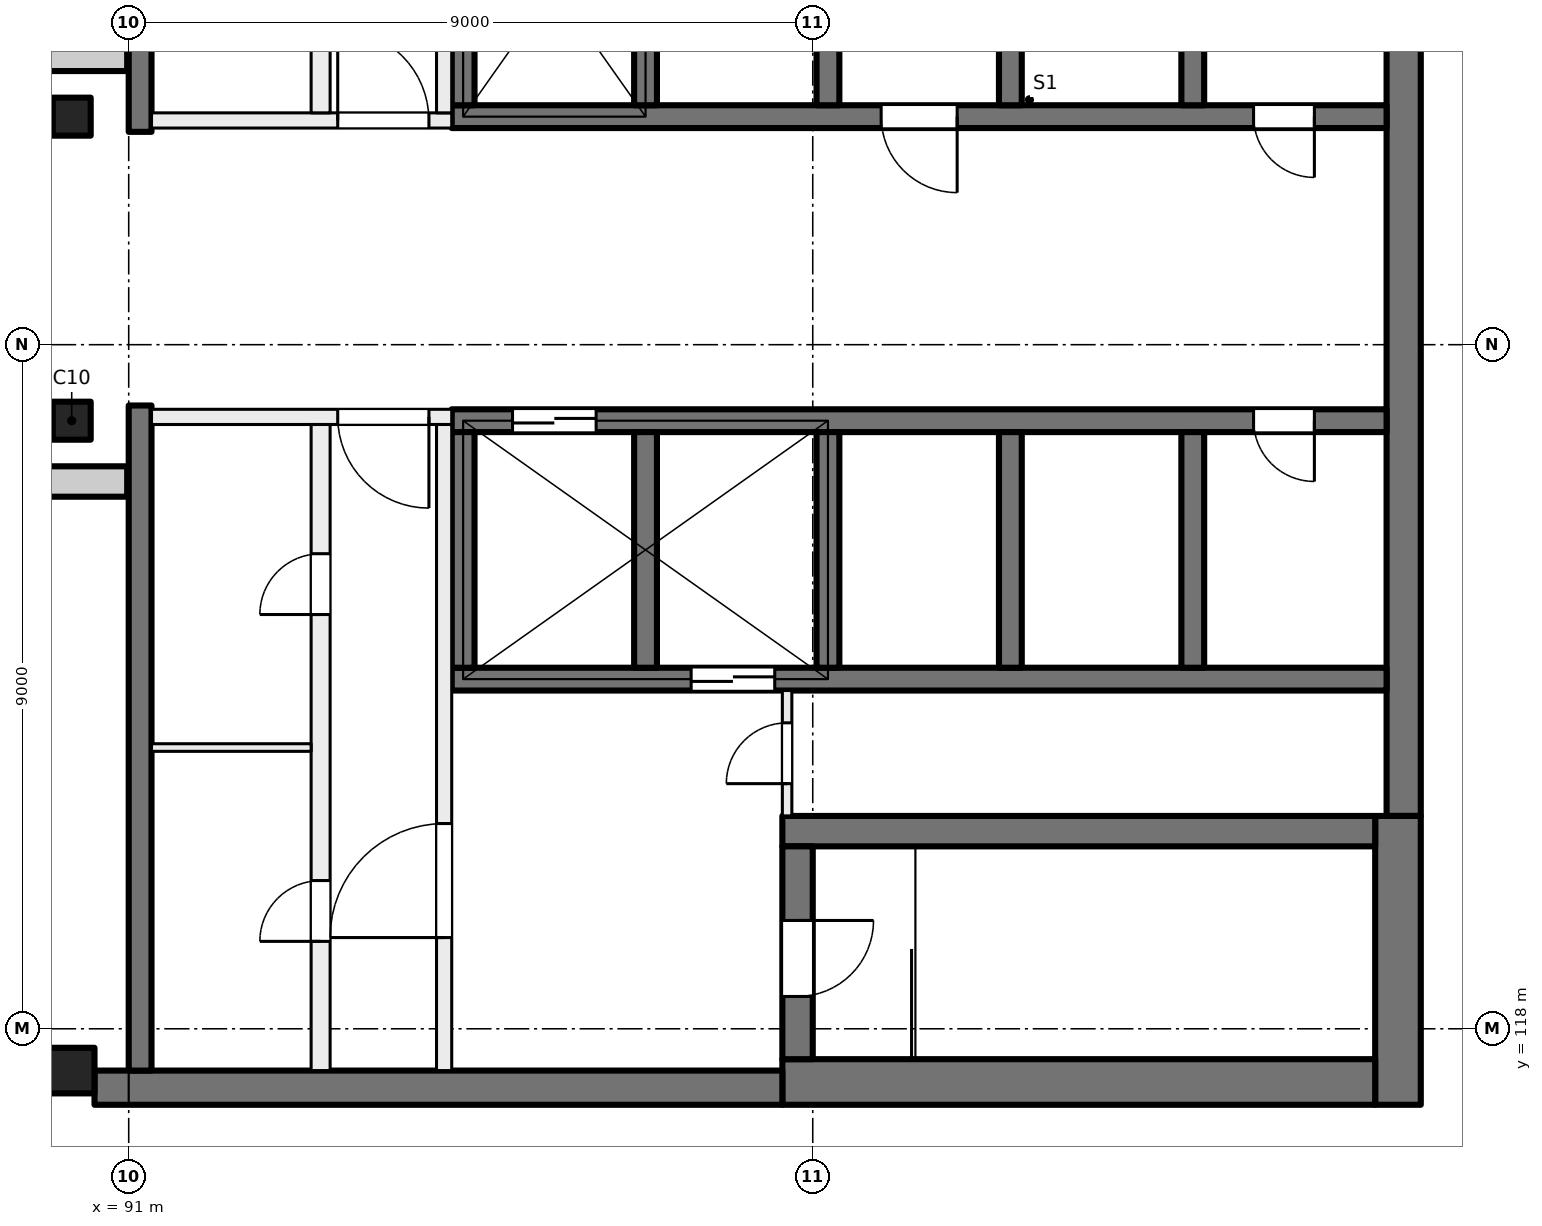
"""IFC4 building model, lengths in metres.
Left out: names, types, materials, properties, quantities, classifications, styles, units other than length and angle.
Written with IfcOpenShell. Run it as: python <this file> out.ifc"""

import sys

from ifc_helpers import new_model, si_unit, direction, frame, frame_2d, origin, origin_2d, place, context, subcontext, project, spatial, rectangle, extrude, element, fill, save


model = new_model("IFC4")
c1 = context("Model", 3, precision=1e-05, world=origin(), true_north=direction((0.0, 1.0)))
c2 = subcontext(c1, "Body", "Model", "MODEL_VIEW")
j1 = project(units=[si_unit("LENGTHUNIT", "METRE"), si_unit("PLANEANGLEUNIT", "RADIAN")], contexts=[c1])
p1 = place(None, origin())
s1 = spatial("IfcSite", under=j1, at=p1, CompositionType="ELEMENT")
p2 = place(p1, origin())
s2 = spatial("IfcBuilding", under=s1, at=p2, CompositionType="ELEMENT")
p3 = place(p2, frame((0.0, 0.0, 295.5)))
s3 = spatial("IfcBuildingStorey", under=s2, at=p3, CompositionType="ELEMENT", Elevation=295.5)
for number, where, z_axis, x_axis in (
    (1, (90.25, 130.0, 0.0), (0.0, 0.0, 1.0), (1.0, 0.0, 0.0)),
    (2, (90.25, 126.0, 0.0), (0.0, 0.0, 1.0), (1.0, 0.0, 0.0)),
):
    element("IfcColumn", number, at=place(p3, frame(where, z_axis=z_axis, x_axis=x_axis)), inside=s3, PredefinedType="COLUMN", context=c2, shape_type="SweptSolid", body=[
        extrude(rectangle(XDim=0.5, YDim=0.5, at=origin_2d()), origin(), (0.0, 0.0, 1.0), 4.5),
    ])
p4 = place(p3, frame((90.25, 117.45, 0.0), z_axis=(0.0, 0.0, 1.0), x_axis=(1.0, 0.0, 0.0)))
e3 = element("IfcColumn", 3, at=p4, inside=s3, PredefinedType="COLUMN", context=c2, shape_type="SweptSolid", body=[
    extrude(rectangle(XDim=0.6, YDim=0.6, at=origin_2d()), origin(), (0.0, 0.0, 1.0), 4.5),
])
p5 = place(p3, frame((107.775, 135.2, 0.0), z_axis=(0.0, 0.0, 1.0), x_axis=(0.0, -1.0, 0.0)))
e4 = element("IfcWall", 4, at=p5, inside=s3, PredefinedType="SHEAR", context=c2, shape_type="SweptSolid", body=[
    extrude(rectangle(XDim=14.4, YDim=0.45, at=frame_2d((7.2, 0.0))), origin(), (0.0, 0.0, 1.0), 4.5),
])
p6 = place(p3, frame((107.7, 120.8, 0.0), z_axis=(0.0, 0.0, 1.0), x_axis=(0.0, -1.0, 0.0)))
e5 = element("IfcWall", 5, at=p6, inside=s3, PredefinedType="SHEAR", context=c2, shape_type="SweptSolid", body=[
    extrude(rectangle(XDim=3.8, YDim=0.6, at=frame_2d((1.9, 0.0))), origin(), (0.0, 0.0, 1.0), 4.5),
])
p7 = place(p3, frame((107.4, 117.3, 0.0), z_axis=(0.0, 0.0, 1.0), x_axis=(-1.0, 0.0, 0.0)))
e6 = element("IfcWall", 6, at=p7, inside=s3, PredefinedType="SHEAR", context=c2, shape_type="SweptSolid", body=[
    extrude(rectangle(XDim=7.8, YDim=0.6, at=frame_2d((3.9, 0.0))), origin(), (0.0, 0.0, 1.0), 4.5),
])
p8 = place(p3, frame((99.6, 117.225, 0.0), z_axis=(0.0, 0.0, 1.0), x_axis=(-1.0, 0.0, 0.0)))
e7 = element("IfcWall", 7, at=p8, inside=s3, PredefinedType="SHEAR", context=c2, shape_type="SweptSolid", body=[
    extrude(rectangle(XDim=9.05, YDim=0.45, at=frame_2d((4.525, 0.0))), origin(), (0.0, 0.0, 1.0), 4.5),
])
p9 = place(p3, frame((107.4, 120.6, 0.0), z_axis=(0.0, 0.0, 1.0), x_axis=(-1.0, 0.0, 0.0)))
e8 = element("IfcWall", 8, at=p9, inside=s3, PredefinedType="SHEAR", context=c2, shape_type="SweptSolid", body=[
    extrude(rectangle(XDim=7.8, YDim=0.4, at=frame_2d((3.9, 0.0))), origin(), (0.0, 0.0, 1.0), 4.5),
])
p10 = place(p3, frame((99.8, 120.4, 0.0), z_axis=(0.0, 0.0, 1.0), x_axis=(0.0, -1.0, 0.0)))
e9 = element("IfcWall", 9, at=p10, inside=s3, PredefinedType="SHEAR", context=c2, shape_type="SweptSolid", body=[
    extrude(rectangle(XDim=2.8, YDim=0.4, at=frame_2d((1.4, 0.0))), origin(), (0.0, 0.0, 1.0), 4.5),
])
p11 = place(p10, frame((0.975, 0.0, 0.0)))
e10 = element("IfcOpeningElement", 10, at=p11, cuts=e9, PredefinedType="OPENING", context=c2, shape_type="SweptSolid", body=[
    extrude(rectangle(XDim=1.0, YDim=2.1, at=frame_2d((0.5, 1.05))), frame((0.0, 0.21, 0.0), z_axis=(0.0, -1.0, 0.0), x_axis=(1.0, 0.0, 0.0)), (0.0, 0.0, 1.0), 0.42),
])
p12 = place(p3, frame((107.55, 130.0, 0.0), z_axis=(0.0, 0.0, 1.0), x_axis=(-1.0, 0.0, 0.0)))
e11 = element("IfcWall", 11, at=p12, inside=s3, PredefinedType="SHEAR", context=c2, shape_type="SweptSolid", body=[
    extrude(rectangle(XDim=12.3, YDim=0.3, at=frame_2d((6.15, 0.0))), origin(), (0.0, 0.0, 1.0), 4.5),
])
p13 = place(p12, frame((0.95, 0.0, 0.0)))
e12 = element("IfcOpeningElement", 12, at=p13, cuts=e11, PredefinedType="OPENING", context=c2, shape_type="SweptSolid", body=[
    extrude(rectangle(XDim=0.8, YDim=2.1, at=frame_2d((0.4, 1.05))), frame((0.0, 0.16, 0.0), z_axis=(0.0, -1.0, 0.0), x_axis=(1.0, 0.0, 0.0)), (0.0, 0.0, 1.0), 0.32),
])
p14 = place(p12, frame((5.65, 0.0, 0.0)))
e13 = element("IfcOpeningElement", 13, at=p14, cuts=e11, PredefinedType="OPENING", context=c2, shape_type="SweptSolid", body=[
    extrude(rectangle(XDim=1.0, YDim=2.1, at=frame_2d((0.5, 1.05))), frame((0.0, 0.16, 0.0), z_axis=(0.0, -1.0, 0.0), x_axis=(1.0, 0.0, 0.0)), (0.0, 0.0, 1.0), 0.32),
])
for number, where, z_axis, x_axis in (
    (14, (105.0, 133.25, 0.0), (0.0, 0.0, 1.0), (0.0, -1.0, 0.0)),
    (15, (102.6, 133.25, 0.0), (0.0, 0.0, 1.0), (0.0, -1.0, 0.0)),
    (16, (100.2, 133.25, 0.0), (0.0, 0.0, 1.0), (0.0, -1.0, 0.0)),
    (17, (97.8, 133.25, 0.0), (0.0, 0.0, 1.0), (0.0, -1.0, 0.0)),
    (18, (95.4, 133.25, 0.0), (0.0, 0.0, 1.0), (0.0, -1.0, 0.0)),
):
    element("IfcWall", number, at=place(p3, frame(where, z_axis=z_axis, x_axis=x_axis)), inside=s3, PredefinedType="SHEAR", context=c2, shape_type="SweptSolid", body=[
        extrude(rectangle(XDim=3.1, YDim=0.3, at=frame_2d((1.55, 0.0))), origin(), (0.0, 0.0, 1.0), 4.5),
    ])
p15 = place(p3, frame((107.55, 126.0, 0.0), z_axis=(0.0, 0.0, 1.0), x_axis=(-1.0, 0.0, 0.0)))
e19 = element("IfcWall", 19, at=p15, inside=s3, PredefinedType="SHEAR", context=c2, shape_type="SweptSolid", body=[
    extrude(rectangle(XDim=12.3, YDim=0.3, at=frame_2d((6.15, 0.0))), origin(), (0.0, 0.0, 1.0), 4.5),
])
p16 = place(p15, frame((10.4, 0.0, 0.0)))
e20 = element("IfcOpeningElement", 20, at=p16, cuts=e19, PredefinedType="OPENING", context=c2, shape_type="SweptSolid", body=[
    extrude(rectangle(XDim=1.1, YDim=2.1, at=frame_2d((0.55, 1.05))), frame((0.0, 0.16, 0.0), z_axis=(0.0, -1.0, 0.0), x_axis=(1.0, 0.0, 0.0)), (0.0, 0.0, 1.0), 0.32),
])
p17 = place(p15, frame((0.95, 0.0, 0.0)))
e21 = element("IfcOpeningElement", 21, at=p17, cuts=e19, PredefinedType="OPENING", context=c2, shape_type="SweptSolid", body=[
    extrude(rectangle(XDim=0.8, YDim=2.1, at=frame_2d((0.4, 1.05))), frame((0.0, 0.16, 0.0), z_axis=(0.0, -1.0, 0.0), x_axis=(1.0, 0.0, 0.0)), (0.0, 0.0, 1.0), 0.32),
])
p18 = place(p3, frame((107.55, 122.6, 0.0), z_axis=(0.0, 0.0, 1.0), x_axis=(-1.0, 0.0, 0.0)))
e22 = element("IfcWall", 22, at=p18, inside=s3, PredefinedType="SHEAR", context=c2, shape_type="SweptSolid", body=[
    extrude(rectangle(XDim=12.3, YDim=0.3, at=frame_2d((6.15, 0.0))), origin(), (0.0, 0.0, 1.0), 4.5),
])
p19 = place(p18, frame((8.05, 0.0, 0.0)))
e23 = element("IfcOpeningElement", 23, at=p19, cuts=e22, PredefinedType="OPENING", context=c2, shape_type="SweptSolid", body=[
    extrude(rectangle(XDim=1.1, YDim=2.1, at=frame_2d((0.55, 1.05))), frame((0.0, 0.16, 0.0), z_axis=(0.0, -1.0, 0.0), x_axis=(1.0, 0.0, 0.0)), (0.0, 0.0, 1.0), 0.32),
])
for number, where, z_axis, x_axis in (
    (24, (105.0, 125.85, 0.0), (0.0, 0.0, 1.0), (0.0, -1.0, 0.0)),
    (25, (102.6, 125.85, 0.0), (0.0, 0.0, 1.0), (0.0, -1.0, 0.0)),
    (26, (100.2, 125.85, 0.0), (0.0, 0.0, 1.0), (0.0, -1.0, 0.0)),
    (27, (97.8, 125.85, 0.0), (0.0, 0.0, 1.0), (0.0, -1.0, 0.0)),
    (28, (95.4, 125.85, 0.0), (0.0, 0.0, 1.0), (0.0, -1.0, 0.0)),
):
    element("IfcWall", number, at=place(p3, frame(where, z_axis=z_axis, x_axis=x_axis)), inside=s3, PredefinedType="SHEAR", context=c2, shape_type="SweptSolid", body=[
        extrude(rectangle(XDim=3.1, YDim=0.3, at=frame_2d((1.55, 0.0))), origin(), (0.0, 0.0, 1.0), 4.5),
    ])
for number, where, z_axis, x_axis in (
    (29, (91.15, 138.55, 0.0), (0.0, 0.0, 1.0), (0.0, -1.0, 0.0)),
    (30, (91.15, 126.2, 0.0), (0.0, 0.0, 1.0), (0.0, -1.0, 0.0)),
):
    element("IfcWall", number, at=place(p3, frame(where, z_axis=z_axis, x_axis=x_axis)), inside=s3, PredefinedType="SHEAR", context=c2, shape_type="SweptSolid", body=[
        extrude(rectangle(XDim=8.75, YDim=0.3, at=frame_2d((4.375, 0.0))), origin(), (0.0, 0.0, 1.0), 4.5),
    ])
p20 = place(p3, frame((90.98, 125.2, 0.0), z_axis=(0.0, 0.0, 1.0), x_axis=(-1.0, 0.0, 0.0)))
e31 = element("IfcWall", 31, at=p20, inside=s3, PredefinedType="SOLIDWALL", context=c2, shape_type="SweptSolid", body=[
    extrude(rectangle(XDim=38.48, YDim=0.4, at=frame_2d((19.24, 0.0))), origin(), (0.0, 0.0, 1.0), 4.125),
])
p21 = place(p3, frame((72.42, 130.8, 0.0), z_axis=(0.0, 0.0, 1.0), x_axis=(1.0, 0.0, 0.0)))
e32 = element("IfcWall", 32, at=p21, inside=s3, PredefinedType="SOLIDWALL", context=c2, shape_type="SweptSolid", body=[
    extrude(rectangle(XDim=18.56, YDim=0.4, at=frame_2d((9.28, 0.0))), origin(), (0.0, 0.0, 1.0), 4.125),
])
p22 = place(p3, frame((95.25, 126.05, 0.0), z_axis=(0.0, 0.0, 1.0), x_axis=(-1.0, 0.0, 0.0)))
e33 = element("IfcWall", 33, at=p22, inside=s3, PredefinedType="PARTITIONING", context=c2, shape_type="SweptSolid", body=[
    extrude(rectangle(XDim=3.95, YDim=0.2, at=frame_2d((1.975, 0.0))), origin(), (0.0, 0.0, 1.0), 4.125),
])
p23 = place(p22, frame((0.3, 0.0, 0.0)))
e34 = element("IfcOpeningElement", 34, at=p23, cuts=e33, PredefinedType="OPENING", context=c2, shape_type="SweptSolid", body=[
    extrude(rectangle(XDim=1.2, YDim=2.1, at=frame_2d((0.6, 1.05))), frame((0.0, 0.11, 0.0), z_axis=(0.0, -1.0, 0.0), x_axis=(1.0, 0.0, 0.0)), (0.0, 0.0, 1.0), 0.22),
])
p24 = place(p3, frame((95.15, 117.45, 0.0), z_axis=(0.0, 0.0, 1.0), x_axis=(0.0, 1.0, 0.0)))
e35 = element("IfcWall", 35, at=p24, inside=s3, PredefinedType="PARTITIONING", context=c2, shape_type="SweptSolid", body=[
    extrude(rectangle(XDim=8.5, YDim=0.2, at=frame_2d((4.25, 0.0))), origin(), (0.0, 0.0, 1.0), 4.125),
])
p25 = place(p24, frame((1.75, 0.0, 0.0)))
e36 = element("IfcOpeningElement", 36, at=p25, cuts=e35, PredefinedType="OPENING", context=c2, shape_type="SweptSolid", body=[
    extrude(rectangle(XDim=1.5, YDim=2.1, at=frame_2d((0.75, 1.05))), frame((0.0, 0.11, 0.0), z_axis=(0.0, -1.0, 0.0), x_axis=(1.0, 0.0, 0.0)), (0.0, 0.0, 1.0), 0.22),
])
p26 = place(p3, frame((93.525, 117.45, 0.0), z_axis=(0.0, 0.0, 1.0), x_axis=(0.0, 1.0, 0.0)))
e37 = element("IfcWall", 37, at=p26, inside=s3, PredefinedType="PARTITIONING", context=c2, shape_type="SweptSolid", body=[
    extrude(rectangle(XDim=8.5, YDim=0.25, at=frame_2d((4.25, 0.0))), origin(), (0.0, 0.0, 1.0), 4.125),
])
p27 = place(p26, frame((6.0, 0.0, 0.0)))
e38 = element("IfcOpeningElement", 38, at=p27, cuts=e37, PredefinedType="OPENING", context=c2, shape_type="SweptSolid", body=[
    extrude(rectangle(XDim=0.8, YDim=2.1, at=frame_2d((0.4, 1.05))), frame((0.0, 0.135, 0.0), z_axis=(0.0, -1.0, 0.0), x_axis=(1.0, 0.0, 0.0)), (0.0, 0.0, 1.0), 0.27),
])
p28 = place(p26, frame((1.7, 0.0, 0.0)))
e39 = element("IfcOpeningElement", 39, at=p28, cuts=e37, PredefinedType="OPENING", context=c2, shape_type="SweptSolid", body=[
    extrude(rectangle(XDim=0.8, YDim=2.1, at=frame_2d((0.4, 1.05))), frame((0.0, 0.135, 0.0), z_axis=(0.0, -1.0, 0.0), x_axis=(1.0, 0.0, 0.0)), (0.0, 0.0, 1.0), 0.27),
])
p29 = place(p3, frame((99.663, 120.8, 0.0), z_axis=(0.0, 0.0, 1.0), x_axis=(0.0, 1.0, 0.0)))
e40 = element("IfcWall", 40, at=p29, inside=s3, PredefinedType="PARTITIONING", context=c2, shape_type="SweptSolid", body=[
    extrude(rectangle(XDim=1.65, YDim=0.125, at=frame_2d((0.825, 0.0))), origin(), (0.0, 0.0, 1.0), 4.125),
])
p30 = place(p29, frame((0.425, 0.0, 0.0)))
e41 = element("IfcOpeningElement", 41, at=p30, cuts=e40, PredefinedType="OPENING", context=c2, shape_type="SweptSolid", body=[
    extrude(rectangle(XDim=0.8, YDim=2.1, at=frame_2d((0.4, 1.05))), frame((0.0, 0.073, 0.0), z_axis=(0.0, -1.0, 0.0), x_axis=(1.0, 0.0, 0.0)), (0.0, 0.0, 1.0), 0.145),
])
p31 = place(p3, frame((93.4, 121.7, 0.0), z_axis=(0.0, 0.0, 1.0), x_axis=(-1.0, 0.0, 0.0)))
e42 = element("IfcWall", 42, at=p31, inside=s3, PredefinedType="PARTITIONING", context=c2, shape_type="SweptSolid", body=[
    extrude(rectangle(XDim=2.1, YDim=0.1, at=frame_2d((1.05, 0.0))), origin(), (0.0, 0.0, 1.0), 4.125),
])
p32 = place(p3, frame((91.3, 129.95, 0.0), z_axis=(0.0, 0.0, 1.0), x_axis=(1.0, 0.0, 0.0)))
e43 = element("IfcWall", 43, at=p32, inside=s3, PredefinedType="PARTITIONING", context=c2, shape_type="SweptSolid", body=[
    extrude(rectangle(XDim=3.95, YDim=0.2, at=frame_2d((1.975, 0.0))), origin(), (0.0, 0.0, 1.0), 4.125),
])
p33 = place(p32, frame((2.45, 0.0, 0.0)))
e44 = element("IfcOpeningElement", 44, at=p33, cuts=e43, PredefinedType="OPENING", context=c2, shape_type="SweptSolid", body=[
    extrude(rectangle(XDim=1.2, YDim=2.1, at=frame_2d((0.6, 1.05))), frame((0.0, 0.11, 0.0), z_axis=(0.0, -1.0, 0.0), x_axis=(1.0, 0.0, 0.0)), (0.0, 0.0, 1.0), 0.22),
])
p34 = place(p3, frame((95.15, 130.05, 0.0), z_axis=(0.0, 0.0, 1.0), x_axis=(0.0, 1.0, 0.0)))
e45 = element("IfcWall", 45, at=p34, inside=s3, PredefinedType="PARTITIONING", context=c2, shape_type="SweptSolid", body=[
    extrude(rectangle(XDim=8.5, YDim=0.2, at=frame_2d((4.25, 0.0))), origin(), (0.0, 0.0, 1.0), 4.125),
])
p35 = place(p34, frame((5.25, 0.0, 0.0)))
e46 = element("IfcOpeningElement", 46, at=p35, cuts=e45, PredefinedType="OPENING", context=c2, shape_type="SweptSolid", body=[
    extrude(rectangle(XDim=1.5, YDim=2.1, at=frame_2d((0.75, 1.05))), frame((0.0, 0.11, 0.0), z_axis=(0.0, -1.0, 0.0), x_axis=(1.0, 0.0, 0.0)), (0.0, 0.0, 1.0), 0.22),
])
p36 = place(p3, frame((93.525, 130.05, 0.0), z_axis=(0.0, 0.0, 1.0), x_axis=(0.0, 1.0, 0.0)))
e47 = element("IfcWall", 47, at=p36, inside=s3, PredefinedType="PARTITIONING", context=c2, shape_type="SweptSolid", body=[
    extrude(rectangle(XDim=8.5, YDim=0.25, at=frame_2d((4.25, 0.0))), origin(), (0.0, 0.0, 1.0), 4.125),
])
p37 = place(p36, frame((0.99, 0.0, 0.0)))
e48 = element("IfcOpeningElement", 48, at=p37, cuts=e47, PredefinedType="OPENING", context=c2, shape_type="SweptSolid", body=[
    extrude(rectangle(XDim=0.8, YDim=2.1, at=frame_2d((0.4, 1.05))), frame((0.0, 0.135, 0.0), z_axis=(0.0, -1.0, 0.0), x_axis=(1.0, 0.0, 0.0)), (0.0, 0.0, 1.0), 0.27),
])
p38 = place(p36, frame((5.29, 0.0, 0.0)))
e49 = element("IfcOpeningElement", 49, at=p38, cuts=e47, PredefinedType="OPENING", context=c2, shape_type="SweptSolid", body=[
    extrude(rectangle(XDim=0.8, YDim=2.1, at=frame_2d((0.4, 1.05))), frame((0.0, 0.135, 0.0), z_axis=(0.0, -1.0, 0.0), x_axis=(1.0, 0.0, 0.0)), (0.0, 0.0, 1.0), 0.27),
])
p39 = place(p16, origin())
e50 = element("IfcDoor", 50, at=p39, inside=s3, OperationType="DOUBLE_DOOR_SLIDING", PredefinedType="DOOR", context=c2, shape_type="SweptSolid", body=[
    extrude(rectangle(XDim=1.1, YDim=2.1, at=frame_2d((0.55, 1.05))), frame((0.0, 0.025, 0.0), z_axis=(0.0, -1.0, 0.0), x_axis=(1.0, 0.0, 0.0)), (0.0, 0.0, 1.0), 0.05),
])
fill(e20, e50)
p40 = place(p17, origin())
e51 = element("IfcDoor", 51, at=p40, inside=s3, OperationType="SINGLE_SWING_LEFT", PredefinedType="DOOR", context=c2, shape_type="SweptSolid", body=[
    extrude(rectangle(XDim=0.8, YDim=2.1, at=frame_2d((0.4, 1.05))), frame((0.0, 0.025, 0.0), z_axis=(0.0, -1.0, 0.0), x_axis=(1.0, 0.0, 0.0)), (0.0, 0.0, 1.0), 0.05),
])
fill(e21, e51)
p41 = place(p13, origin())
e52 = element("IfcDoor", 52, at=p41, inside=s3, OperationType="SINGLE_SWING_RIGHT", PredefinedType="DOOR", context=c2, shape_type="SweptSolid", body=[
    extrude(rectangle(XDim=0.8, YDim=2.1, at=frame_2d((0.4, 1.05))), frame((0.0, 0.025, 0.0), z_axis=(0.0, -1.0, 0.0), x_axis=(1.0, 0.0, 0.0)), (0.0, 0.0, 1.0), 0.05),
])
fill(e12, e52)
p42 = place(p14, origin())
e53 = element("IfcDoor", 53, at=p42, inside=s3, OperationType="SINGLE_SWING_LEFT", PredefinedType="DOOR", context=c2, shape_type="SweptSolid", body=[
    extrude(rectangle(XDim=1.0, YDim=2.1, at=frame_2d((0.5, 1.05))), frame((0.0, 0.025, 0.0), z_axis=(0.0, -1.0, 0.0), x_axis=(1.0, 0.0, 0.0)), (0.0, 0.0, 1.0), 0.05),
])
fill(e13, e53)
p43 = place(p23, origin())
e54 = element("IfcDoor", 54, at=p43, inside=s3, OperationType="DOUBLE_DOOR_SINGLE_SWING", PredefinedType="DOOR", context=c2, shape_type="SweptSolid", body=[
    extrude(rectangle(XDim=1.2, YDim=2.1, at=frame_2d((0.6, 1.05))), frame((0.0, 0.025, 0.0), z_axis=(0.0, -1.0, 0.0), x_axis=(1.0, 0.0, 0.0)), (0.0, 0.0, 1.0), 0.05),
])
fill(e34, e54)
p44 = place(p25, origin())
e55 = element("IfcDoor", 55, at=p44, inside=s3, OperationType="DOUBLE_DOOR_SINGLE_SWING", PredefinedType="DOOR", context=c2, shape_type="SweptSolid", body=[
    extrude(rectangle(XDim=1.5, YDim=2.1, at=frame_2d((0.75, 1.05))), frame((0.0, 0.025, 0.0), z_axis=(0.0, -1.0, 0.0), x_axis=(1.0, 0.0, 0.0)), (0.0, 0.0, 1.0), 0.05),
])
fill(e36, e55)
p45 = place(p11, origin())
e56 = element("IfcDoor", 56, at=p45, inside=s3, OperationType="SINGLE_SWING_LEFT", PredefinedType="DOOR", context=c2, shape_type="SweptSolid", body=[
    extrude(rectangle(XDim=1.0, YDim=2.1, at=frame_2d((0.5, 1.05))), frame((0.0, 0.025, 0.0), z_axis=(0.0, -1.0, 0.0), x_axis=(1.0, 0.0, 0.0)), (0.0, 0.0, 1.0), 0.05),
])
fill(e10, e56)
p46 = place(p30, origin())
e57 = element("IfcDoor", 57, at=p46, inside=s3, OperationType="SINGLE_SWING_RIGHT", PredefinedType="DOOR", context=c2, shape_type="SweptSolid", body=[
    extrude(rectangle(XDim=0.8, YDim=2.1, at=frame_2d((0.4, 1.05))), frame((0.0, 0.025, 0.0), z_axis=(0.0, -1.0, 0.0), x_axis=(1.0, 0.0, 0.0)), (0.0, 0.0, 1.0), 0.05),
])
fill(e41, e57)
p47 = place(p27, origin())
e58 = element("IfcDoor", 58, at=p47, inside=s3, OperationType="SINGLE_SWING_LEFT", PredefinedType="DOOR", context=c2, shape_type="SweptSolid", body=[
    extrude(rectangle(XDim=0.8, YDim=2.1, at=frame_2d((0.4, 1.05))), frame((0.0, 0.025, 0.0), z_axis=(0.0, -1.0, 0.0), x_axis=(1.0, 0.0, 0.0)), (0.0, 0.0, 1.0), 0.05),
])
fill(e38, e58)
p48 = place(p28, origin())
e59 = element("IfcDoor", 59, at=p48, inside=s3, OperationType="SINGLE_SWING_RIGHT", PredefinedType="DOOR", context=c2, shape_type="SweptSolid", body=[
    extrude(rectangle(XDim=0.8, YDim=2.1, at=frame_2d((0.4, 1.05))), frame((0.0, 0.025, 0.0), z_axis=(0.0, -1.0, 0.0), x_axis=(1.0, 0.0, 0.0)), (0.0, 0.0, 1.0), 0.05),
])
fill(e39, e59)
p49 = place(p33, origin())
e60 = element("IfcDoor", 60, at=p49, inside=s3, OperationType="DOUBLE_DOOR_SINGLE_SWING", PredefinedType="DOOR", context=c2, shape_type="SweptSolid", body=[
    extrude(rectangle(XDim=1.2, YDim=2.1, at=frame_2d((0.6, 1.05))), frame((0.0, 0.025, 0.0), z_axis=(0.0, -1.0, 0.0), x_axis=(1.0, 0.0, 0.0)), (0.0, 0.0, 1.0), 0.05),
])
fill(e44, e60)
p50 = place(p19, origin())
e61 = element("IfcDoor", 61, at=p50, inside=s3, OperationType="DOUBLE_DOOR_SLIDING", PredefinedType="DOOR", context=c2, shape_type="SweptSolid", body=[
    extrude(rectangle(XDim=1.1, YDim=2.1, at=frame_2d((0.55, 1.05))), frame((0.0, 0.025, 0.0), z_axis=(0.0, -1.0, 0.0), x_axis=(1.0, 0.0, 0.0)), (0.0, 0.0, 1.0), 0.05),
])
fill(e23, e61)
save(model, sys.argv[1])
